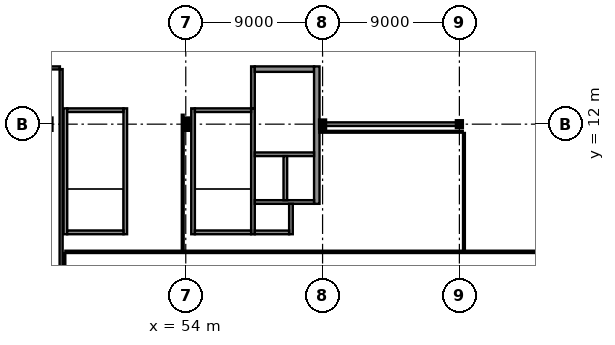
"""IFC4 building model, lengths in metres.
Left out: names, types, materials, properties, quantities, classifications, styles, units other than length and angle.
Written with IfcOpenShell. Run it as: python <this file> out.ifc"""

import sys

from ifc_helpers import new_model, si_unit, direction, frame, frame_2d, origin, origin_2d, place, context, subcontext, project, spatial, rectangle, i_section, extrude, element, fill, save


model = new_model("IFC4")
c1 = context("Model", 3, precision=1e-05, world=origin(), true_north=direction((0.0, 1.0)))
c2 = subcontext(c1, "Body", "Model", "MODEL_VIEW")
j1 = project(units=[si_unit("LENGTHUNIT", "METRE"), si_unit("PLANEANGLEUNIT", "RADIAN")], contexts=[c1])
p1 = place(None, origin())
s1 = spatial("IfcSite", under=j1, at=p1, CompositionType="ELEMENT")
p2 = place(p1, origin())
s2 = spatial("IfcBuilding", under=s1, at=p2, CompositionType="ELEMENT")
p3 = place(p2, frame((0.0, 0.0, 9.9)))
s3 = spatial("IfcBuildingStorey", under=s2, at=p3, CompositionType="ELEMENT", Elevation=9.9)
p4 = place(p3, frame((54.0, 12.0, 0.0), z_axis=(0.0, 0.0, 1.0), x_axis=(1.0, 0.0, 0.0)))
e1 = element("IfcColumn", 1, at=p4, inside=s3, PredefinedType="COLUMN", context=c2, shape_type="SweptSolid", body=[
    extrude(i_section(OverallWidth=0.304, OverallDepth=0.716, WebThickness=0.021, FlangeThickness=0.04, at=origin_2d()), origin(), (0.0, 0.0, 1.0), 4.5),
])
p5 = place(p3, frame((63.0, 12.0, 0.0), z_axis=(0.0, 0.0, 1.0), x_axis=(1.0, 0.0, 0.0)))
e2 = element("IfcColumn", 2, at=p5, inside=s3, PredefinedType="COLUMN", context=c2, shape_type="SweptSolid", body=[
    extrude(i_section(OverallWidth=0.3, OverallDepth=0.45, WebThickness=0.014, FlangeThickness=0.026, at=origin_2d()), origin(), (0.0, 0.0, 1.0), 4.5),
])
p6 = place(p3, frame((72.0, 12.0, 0.0), z_axis=(0.0, 0.0, 1.0), x_axis=(0.0, 1.0, 0.0)))
e3 = element("IfcColumn", 3, at=p6, inside=s3, PredefinedType="COLUMN", context=c2, shape_type="SweptSolid", body=[
    extrude(i_section(OverallWidth=0.3, OverallDepth=0.36, WebThickness=0.012, FlangeThickness=0.022, at=origin_2d()), origin(), (0.0, 0.0, 1.0), 4.5),
])
p7 = place(p3, frame((54.48, 4.76, 0.0), z_axis=(0.0, 0.0, 1.0), x_axis=(0.0, 1.0, 0.0)))
e4 = element("IfcWall", 4, at=p7, inside=s3, PredefinedType="SHEAR", context=c2, shape_type="SweptSolid", body=[
    extrude(rectangle(XDim=8.28, YDim=0.24, at=frame_2d((4.14, 0.0))), origin(), (0.0, 0.0, 1.0), 4.31),
])
p8 = place(p3, frame((58.42, 4.76, 0.0), z_axis=(0.0, 0.0, 1.0), x_axis=(0.0, 1.0, 0.0)))
e5 = element("IfcWall", 5, at=p8, inside=s3, PredefinedType="SHEAR", context=c2, shape_type="SweptSolid", body=[
    extrude(rectangle(XDim=8.28, YDim=0.24, at=frame_2d((4.14, 0.0))), origin(), (0.0, 0.0, 1.0), 4.31),
])
p9 = place(p8, frame((6.49, 0.0, 0.0)))
e6 = element("IfcOpeningElement", 6, at=p9, cuts=e5, PredefinedType="OPENING", context=c2, shape_type="SweptSolid", body=[
    extrude(rectangle(XDim=1.3, YDim=2.2, at=frame_2d((0.65, 1.1))), frame((0.0, 0.135, 0.0), z_axis=(0.0, -1.0, 0.0), x_axis=(1.0, 0.0, 0.0)), (0.0, 0.0, 1.0), 0.27),
])
for number, where, z_axis, x_axis in (
    (7, (54.6, 4.88, 0.0), (0.0, 0.0, 1.0), (1.0, 0.0, 0.0)),
    (8, (54.6, 12.92, 0.0), (0.0, 0.0, 1.0), (1.0, 0.0, 0.0)),
):
    element("IfcWall", number, at=place(p3, frame(where, z_axis=z_axis, x_axis=x_axis)), inside=s3, PredefinedType="SHEAR", context=c2, shape_type="SweptSolid", body=[
        extrude(rectangle(XDim=3.7, YDim=0.24, at=frame_2d((1.85, 0.0))), origin(), (0.0, 0.0, 1.0), 4.31),
    ])
p10 = place(p3, frame((46.08, 4.76, 0.0), z_axis=(0.0, 0.0, 1.0), x_axis=(0.0, 1.0, 0.0)))
e9 = element("IfcWall", 9, at=p10, inside=s3, PredefinedType="SHEAR", context=c2, shape_type="SweptSolid", body=[
    extrude(rectangle(XDim=8.28, YDim=0.24, at=frame_2d((4.14, 0.0))), origin(), (0.0, 0.0, 1.0), 4.31),
])
p11 = place(p3, frame((50.02, 4.76, 0.0), z_axis=(0.0, 0.0, 1.0), x_axis=(0.0, 1.0, 0.0)))
e10 = element("IfcWall", 10, at=p11, inside=s3, PredefinedType="SHEAR", context=c2, shape_type="SweptSolid", body=[
    extrude(rectangle(XDim=8.28, YDim=0.24, at=frame_2d((4.14, 0.0))), origin(), (0.0, 0.0, 1.0), 4.31),
])
p12 = place(p11, frame((6.49, 0.0, 0.0)))
e11 = element("IfcOpeningElement", 11, at=p12, cuts=e10, PredefinedType="OPENING", context=c2, shape_type="SweptSolid", body=[
    extrude(rectangle(XDim=1.3, YDim=2.2, at=frame_2d((0.65, 1.1))), frame((0.0, 0.135, 0.0), z_axis=(0.0, -1.0, 0.0), x_axis=(1.0, 0.0, 0.0)), (0.0, 0.0, 1.0), 0.27),
])
for number, where, z_axis, x_axis in (
    (12, (46.2, 4.88, 0.0), (0.0, 0.0, 1.0), (1.0, 0.0, 0.0)),
    (13, (46.2, 12.92, 0.0), (0.0, 0.0, 1.0), (1.0, 0.0, 0.0)),
):
    element("IfcWall", number, at=place(p3, frame(where, z_axis=z_axis, x_axis=x_axis)), inside=s3, PredefinedType="SHEAR", context=c2, shape_type="SweptSolid", body=[
        extrude(rectangle(XDim=3.7, YDim=0.24, at=frame_2d((1.85, 0.0))), origin(), (0.0, 0.0, 1.0), 4.31),
    ])
p13 = place(p3, frame((58.42, 13.04, 0.0), z_axis=(0.0, 0.0, 1.0), x_axis=(0.0, 1.0, 0.0)))
e14 = element("IfcWall", 14, at=p13, inside=s3, PredefinedType="SHEAR", context=c2, shape_type="SweptSolid", body=[
    extrude(rectangle(XDim=2.76, YDim=0.24, at=frame_2d((1.38, 0.0))), origin(), (0.0, 0.0, 1.0), 4.16),
])
p14 = place(p3, frame((58.54, 15.62, 0.0), z_axis=(0.0, 0.0, 1.0), x_axis=(1.0, 0.0, 0.0)))
e15 = element("IfcWall", 15, at=p14, inside=s3, PredefinedType="SHEAR", context=c2, shape_type="SweptSolid", body=[
    extrude(rectangle(XDim=3.9, YDim=0.36, at=frame_2d((1.95, 0.0))), origin(), (0.0, 0.0, 1.0), 4.16),
])
p15 = place(p14, frame((1.15, 0.0, 0.0)))
e16 = element("IfcOpeningElement", 16, at=p15, cuts=e15, PredefinedType="OPENING", context=c2, shape_type="SweptSolid", body=[
    extrude(rectangle(XDim=1.6, YDim=2.25, at=frame_2d((0.8, 1.125))), frame((0.0, 0.195, 0.0), z_axis=(0.0, -1.0, 0.0), x_axis=(1.0, 0.0, 0.0)), (0.0, 0.0, 1.0), 0.39),
])
p16 = place(p3, frame((62.62, 6.76, 0.0), z_axis=(0.0, 0.0, 1.0), x_axis=(0.0, 1.0, 0.0)))
e17 = element("IfcWall", 17, at=p16, inside=s3, PredefinedType="SHEAR", context=c2, shape_type="SweptSolid", body=[
    extrude(rectangle(XDim=9.04, YDim=0.36, at=frame_2d((4.52, 0.0))), origin(), (0.0, 0.0, 1.0), 4.16),
])
p17 = place(p3, frame((58.54, 10.02, 0.0), z_axis=(0.0, 0.0, 1.0), x_axis=(1.0, 0.0, 0.0)))
e18 = element("IfcWall", 18, at=p17, inside=s3, PredefinedType="SHEAR", context=c2, shape_type="SweptSolid", body=[
    extrude(rectangle(XDim=3.9, YDim=0.24, at=frame_2d((1.95, 0.0))), origin(), (0.0, 0.0, 1.0), 4.31),
])
p18 = place(p17, frame((0.235, 0.0, 0.0)))
e19 = element("IfcOpeningElement", 19, at=p18, cuts=e18, PredefinedType="OPENING", context=c2, shape_type="SweptSolid", body=[
    extrude(rectangle(XDim=1.6, YDim=2.3, at=frame_2d((0.8, 1.15))), frame((0.0, 0.135, 0.0), z_axis=(0.0, -1.0, 0.0), x_axis=(1.0, 0.0, 0.0)), (0.0, 0.0, 1.0), 0.27),
])
p19 = place(p17, frame((2.185, 0.0, 0.0)))
e20 = element("IfcOpeningElement", 20, at=p19, cuts=e18, PredefinedType="OPENING", context=c2, shape_type="SweptSolid", body=[
    extrude(rectangle(XDim=1.6, YDim=2.3, at=frame_2d((0.8, 1.15))), frame((0.0, 0.135, 0.0), z_axis=(0.0, -1.0, 0.0), x_axis=(1.0, 0.0, 0.0)), (0.0, 0.0, 1.0), 0.27),
])
p20 = place(p3, frame((58.54, 6.88, 0.0), z_axis=(0.0, 0.0, 1.0), x_axis=(1.0, 0.0, 0.0)))
e21 = element("IfcWall", 21, at=p20, inside=s3, PredefinedType="SHEAR", context=c2, shape_type="SweptSolid", body=[
    extrude(rectangle(XDim=3.9, YDim=0.24, at=frame_2d((1.95, 0.0))), origin(), (0.0, 0.0, 1.0), 4.31),
])
p21 = place(p3, frame((60.55, 7.0, 0.0), z_axis=(0.0, 0.0, 1.0), x_axis=(0.0, 1.0, 0.0)))
e22 = element("IfcWall", 22, at=p21, inside=s3, PredefinedType="SHEAR", context=c2, shape_type="SweptSolid", body=[
    extrude(rectangle(XDim=2.9, YDim=0.24, at=frame_2d((1.45, 0.0))), origin(), (0.0, 0.0, 1.0), 4.31),
])
p22 = place(p3, frame((60.92, 4.76, 0.0), z_axis=(0.0, 0.0, 1.0), x_axis=(0.0, 1.0, 0.0)))
e23 = element("IfcWall", 23, at=p22, inside=s3, PredefinedType="SHEAR", context=c2, shape_type="SweptSolid", body=[
    extrude(rectangle(XDim=2.0, YDim=0.24, at=frame_2d((1.0, 0.0))), origin(), (0.0, 0.0, 1.0), 4.31),
])
p23 = place(p3, frame((58.54, 4.88, 0.0), z_axis=(0.0, 0.0, 1.0), x_axis=(1.0, 0.0, 0.0)))
e24 = element("IfcWall", 24, at=p23, inside=s3, PredefinedType="SHEAR", context=c2, shape_type="SweptSolid", body=[
    extrude(rectangle(XDim=2.26, YDim=0.24, at=frame_2d((1.13, 0.0))), origin(), (0.0, 0.0, 1.0), 4.31),
])
p24 = place(p3, frame((63.008, 12.0, 0.0), z_axis=(0.0, 0.0, 1.0), x_axis=(1.0, 0.0, 0.0)))
e25 = element("IfcWall", 25, at=p24, inside=s3, PredefinedType="SHEAR", context=c2, shape_type="SweptSolid", body=[
    extrude(rectangle(XDim=8.814, YDim=0.24, at=frame_2d((4.407, 0.0))), origin(), (0.0, 0.0, 1.0), 3.675),
])
p25 = place(p3, frame((46.0, 0.145, 0.0), z_axis=(0.0, 0.0, 1.0), x_axis=(0.0, 1.0, 0.0)))
e26 = element("IfcWall", 26, at=p25, inside=s3, PredefinedType="PARTITIONING", context=c2, shape_type="SweptSolid", body=[
    extrude(rectangle(XDim=3.375, YDim=0.15, at=frame_2d((1.688, 0.0))), origin(), (0.0, 0.0, 1.0), 4.14),
])
p26 = place(p3, frame((46.08, 3.6, 0.0), z_axis=(0.0, 0.0, 1.0), x_axis=(1.0, 0.0, 0.0)))
e27 = element("IfcWall", 27, at=p26, inside=s3, PredefinedType="PARTITIONING", context=c2, shape_type="SweptSolid", body=[
    extrude(rectangle(XDim=71.04, YDim=0.15, at=frame_2d((35.52, 0.0))), origin(), (0.0, 0.0, 1.0), 4.14),
])
p27 = place(p26, frame((27.595, 0.0, 0.0)))
e28 = element("IfcOpeningElement", 28, at=p27, cuts=e27, PredefinedType="OPENING", context=c2, shape_type="SweptSolid", body=[
    extrude(rectangle(XDim=1.05, YDim=2.25, at=frame_2d((0.525, 1.125))), frame((0.0, 0.09, 0.0), z_axis=(0.0, -1.0, 0.0), x_axis=(1.0, 0.0, 0.0)), (0.0, 0.0, 1.0), 0.18),
])
p28 = place(p3, frame((53.8, 12.62, 0.0), z_axis=(0.0, 0.0, 1.0), x_axis=(0.0, -1.0, 0.0)))
e29 = element("IfcWall", 29, at=p28, inside=s3, PredefinedType="PARTITIONING", context=c2, shape_type="SweptSolid", body=[
    extrude(rectangle(XDim=8.95, YDim=0.12, at=frame_2d((4.475, 0.0))), origin(), (0.0, 0.0, 1.0), 3.685),
])
p29 = place(p3, frame((32.545, 15.7, 0.0), z_axis=(0.0, 0.0, 1.0), x_axis=(1.0, 0.0, 0.0)))
e30 = element("IfcWall", 30, at=p29, inside=s3, PredefinedType="PARTITIONING", context=c2, shape_type="SweptSolid", body=[
    extrude(rectangle(XDim=13.175, YDim=0.2, at=frame_2d((6.587, 0.0))), origin(), (0.0, 0.0, 1.0), 4.14),
])
p30 = place(p29, frame((5.587, 0.0, 0.0)))
e31 = element("IfcOpeningElement", 31, at=p30, cuts=e30, PredefinedType="OPENING", context=c2, shape_type="SweptSolid", body=[
    extrude(rectangle(XDim=2.0, YDim=2.6, at=frame_2d((1.0, 1.3))), frame((0.0, 0.115, 0.0), z_axis=(0.0, -1.0, 0.0), x_axis=(1.0, 0.0, 0.0)), (0.0, 0.0, 1.0), 0.23),
])
p31 = place(p3, frame((45.8, 15.62, 0.0), z_axis=(0.0, 0.0, 1.0), x_axis=(0.0, -1.0, 0.0)))
e32 = element("IfcWall", 32, at=p31, inside=s3, PredefinedType="PARTITIONING", context=c2, shape_type="SweptSolid", body=[
    extrude(rectangle(XDim=15.14, YDim=0.2, at=frame_2d((7.57, 0.0))), origin(), (0.0, 0.0, 1.0), 4.14),
])
p32 = place(p3, frame((62.795, 11.5, 0.0), z_axis=(0.0, 0.0, 1.0), x_axis=(1.0, 0.0, 0.0)))
e33 = element("IfcWall", 33, at=p32, inside=s3, PredefinedType="PARTITIONING", context=c2, shape_type="SweptSolid", body=[
    extrude(rectangle(XDim=9.425, YDim=0.12, at=frame_2d((4.712, 0.0))), origin(), (0.0, 0.0, 1.0), 4.14),
])
p33 = place(p3, frame((72.3, 11.42, 0.0), z_axis=(0.0, 0.0, 1.0), x_axis=(0.0, -1.0, 0.0)))
e34 = element("IfcWall", 34, at=p33, inside=s3, PredefinedType="PARTITIONING", context=c2, shape_type="SweptSolid", body=[
    extrude(rectangle(XDim=7.75, YDim=0.12, at=frame_2d((3.875, 0.0))), origin(), (0.0, 0.0, 1.0), 4.14),
])
p34 = place(p33, frame((3.4, 0.0, 0.0)))
e35 = element("IfcOpeningElement", 35, at=p34, cuts=e34, PredefinedType="OPENING", context=c2, shape_type="SweptSolid", body=[
    extrude(rectangle(XDim=0.95, YDim=2.15, at=frame_2d((0.475, 1.075))), frame((0.0, 0.075, 0.0), z_axis=(0.0, -1.0, 0.0), x_axis=(1.0, 0.0, 0.0)), (0.0, 0.0, 1.0), 0.15),
])
p35 = place(p9, frame((1.3, 0.0, 0.0), z_axis=(0.0, 0.0, 1.0), x_axis=(-1.0, 0.0, 0.0)))
e36 = element("IfcDoor", 36, at=p35, inside=s3, OperationType="SINGLE_SWING_RIGHT", PredefinedType="DOOR", context=c2, shape_type="SweptSolid", body=[
    extrude(rectangle(XDim=1.3, YDim=2.2, at=frame_2d((0.65, 1.1))), frame((0.0, 0.025, 0.0), z_axis=(0.0, -1.0, 0.0), x_axis=(1.0, 0.0, 0.0)), (0.0, 0.0, 1.0), 0.05),
])
fill(e6, e36)
p36 = place(p12, frame((1.3, 0.0, 0.0), z_axis=(0.0, 0.0, 1.0), x_axis=(-1.0, 0.0, 0.0)))
e37 = element("IfcDoor", 37, at=p36, inside=s3, OperationType="SINGLE_SWING_RIGHT", PredefinedType="DOOR", context=c2, shape_type="SweptSolid", body=[
    extrude(rectangle(XDim=1.3, YDim=2.2, at=frame_2d((0.65, 1.1))), frame((0.0, 0.025, 0.0), z_axis=(0.0, -1.0, 0.0), x_axis=(1.0, 0.0, 0.0)), (0.0, 0.0, 1.0), 0.05),
])
fill(e11, e37)
p37 = place(p15, origin())
e38 = element("IfcDoor", 38, at=p37, inside=s3, OperationType="DOUBLE_DOOR_SINGLE_SWING", PredefinedType="DOOR", context=c2, shape_type="SweptSolid", body=[
    extrude(rectangle(XDim=1.6, YDim=2.25, at=frame_2d((0.8, 1.125))), frame((0.0, 0.025, 0.0), z_axis=(0.0, -1.0, 0.0), x_axis=(1.0, 0.0, 0.0)), (0.0, 0.0, 1.0), 0.05),
])
fill(e16, e38)
p38 = place(p18, origin())
e39 = element("IfcDoor", 39, at=p38, inside=s3, OperationType="DOUBLE_DOOR_SLIDING", PredefinedType="DOOR", context=c2, shape_type="SweptSolid", body=[
    extrude(rectangle(XDim=1.6, YDim=2.3, at=frame_2d((0.8, 1.15))), frame((0.0, 0.025, 0.0), z_axis=(0.0, -1.0, 0.0), x_axis=(1.0, 0.0, 0.0)), (0.0, 0.0, 1.0), 0.05),
])
fill(e19, e39)
p39 = place(p19, origin())
e40 = element("IfcDoor", 40, at=p39, inside=s3, OperationType="DOUBLE_DOOR_SLIDING", PredefinedType="DOOR", context=c2, shape_type="SweptSolid", body=[
    extrude(rectangle(XDim=1.6, YDim=2.3, at=frame_2d((0.8, 1.15))), frame((0.0, 0.025, 0.0), z_axis=(0.0, -1.0, 0.0), x_axis=(1.0, 0.0, 0.0)), (0.0, 0.0, 1.0), 0.05),
])
fill(e20, e40)
p40 = place(p27, frame((1.05, 0.0, 0.0), z_axis=(0.0, 0.0, 1.0), x_axis=(-1.0, 0.0, 0.0)))
e41 = element("IfcDoor", 41, at=p40, inside=s3, OperationType="SINGLE_SWING_RIGHT", PredefinedType="DOOR", context=c2, shape_type="SweptSolid", body=[
    extrude(rectangle(XDim=1.05, YDim=2.25, at=frame_2d((0.525, 1.125))), frame((0.0, 0.025, 0.0), z_axis=(0.0, -1.0, 0.0), x_axis=(1.0, 0.0, 0.0)), (0.0, 0.0, 1.0), 0.05),
])
fill(e28, e41)
p41 = place(p34, frame((0.95, 0.0, 0.0), z_axis=(0.0, 0.0, 1.0), x_axis=(-1.0, 0.0, 0.0)))
e42 = element("IfcDoor", 42, at=p41, inside=s3, OperationType="SINGLE_SWING_RIGHT", PredefinedType="DOOR", context=c2, shape_type="SweptSolid", body=[
    extrude(rectangle(XDim=0.95, YDim=2.15, at=frame_2d((0.475, 1.075))), frame((0.0, 0.025, 0.0), z_axis=(0.0, -1.0, 0.0), x_axis=(1.0, 0.0, 0.0)), (0.0, 0.0, 1.0), 0.05),
])
fill(e35, e42)
save(model, sys.argv[1])
